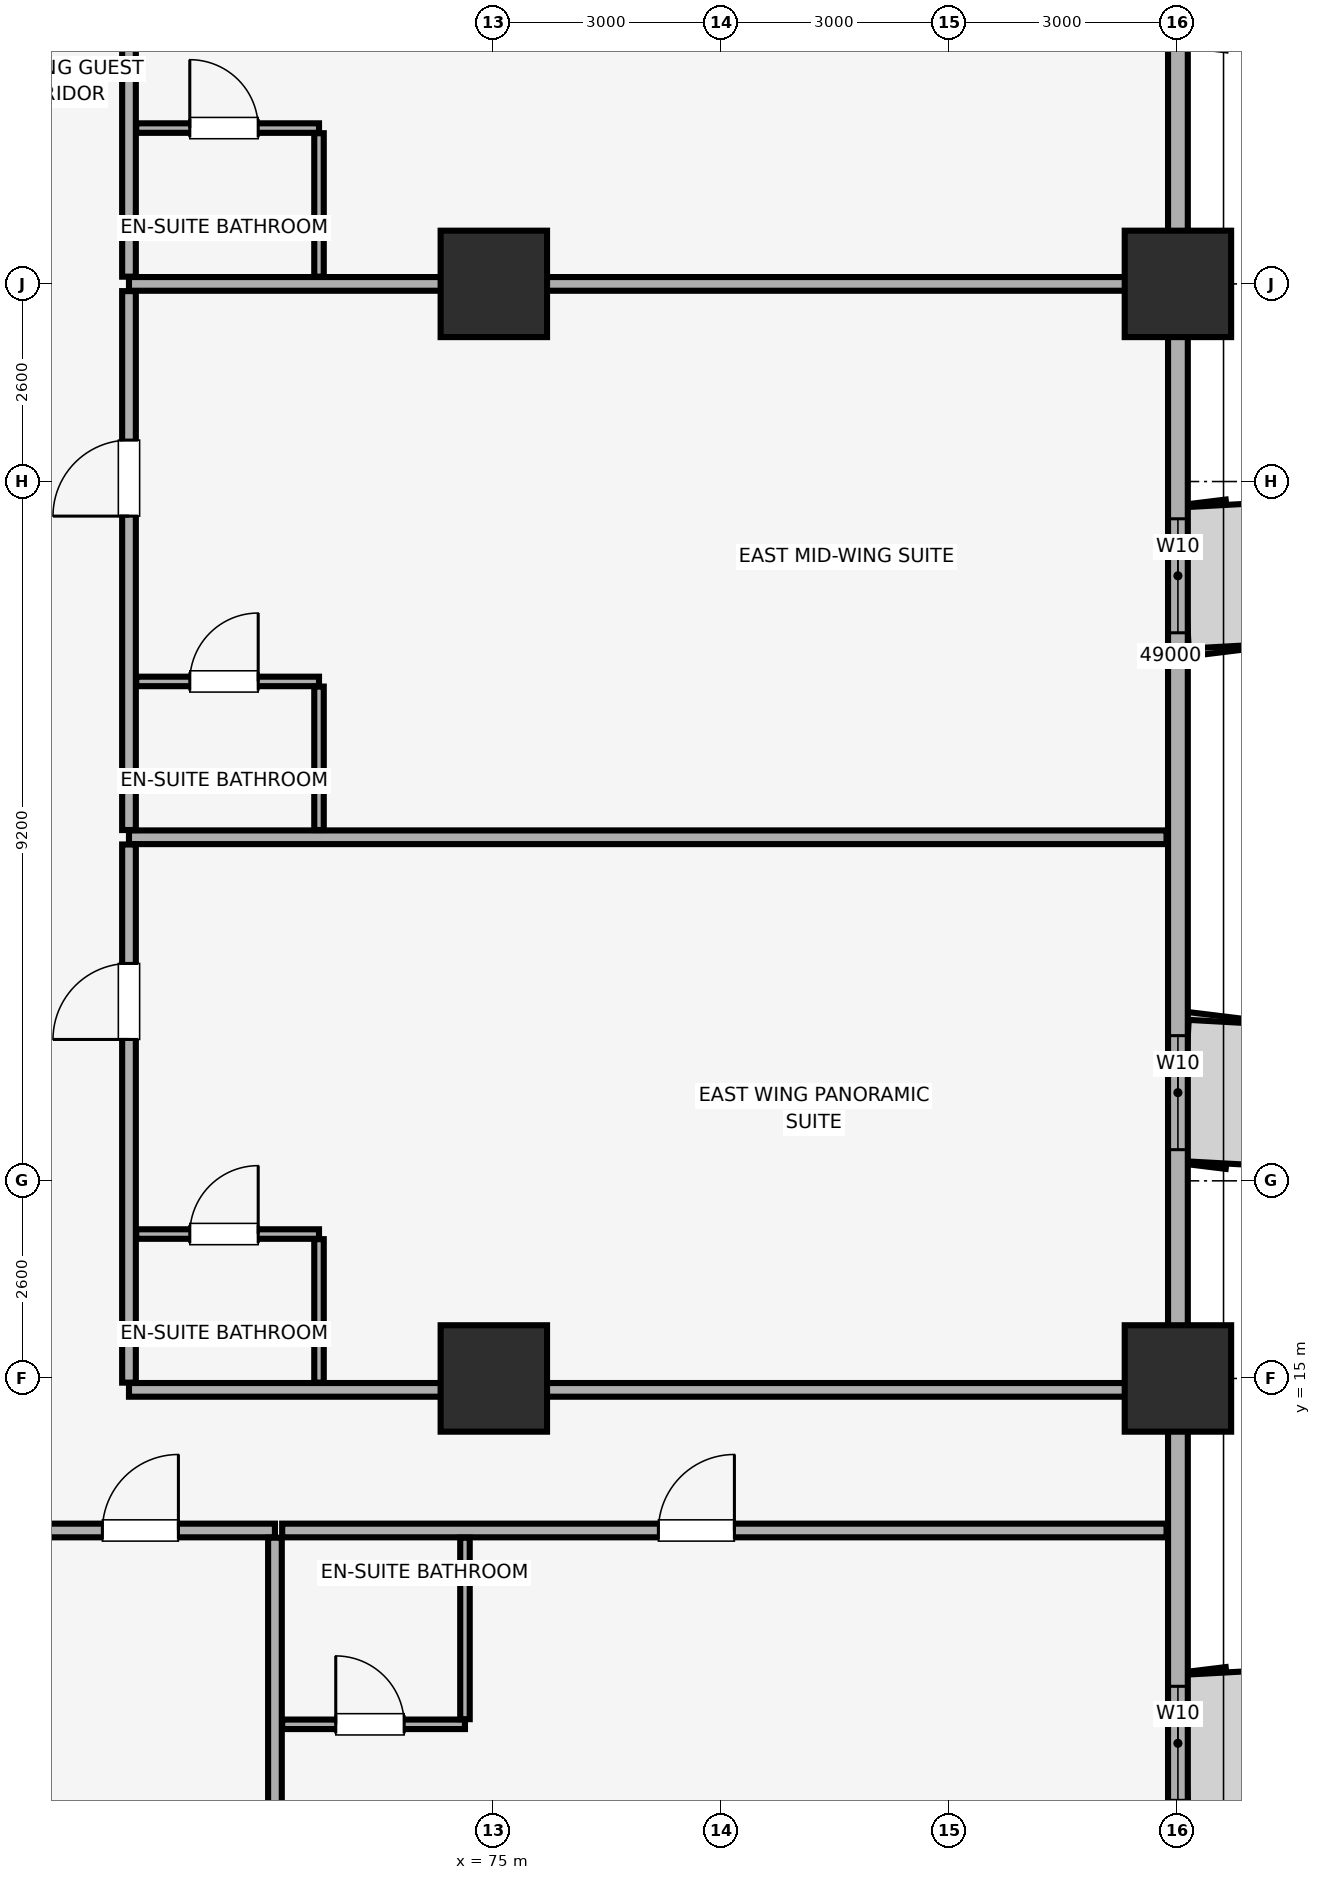
"""IFC4 building model, lengths in metres.
Left out: names, types, materials, properties, quantities, classifications, styles, units other than length and angle.
Written with IfcOpenShell. Run it as: python <this file> out.ifc"""

import sys

from ifc_helpers import new_model, si_unit, direction, frame, frame_2d, origin, origin_2d, place, context, subcontext, project, spatial, rectangle, extrude, element, fill, save


model = new_model("IFC4")
c1 = context("Model", 3, precision=1e-05, world=origin(), true_north=direction((0.0, 1.0)))
c2 = subcontext(c1, "Body", "Model", "MODEL_VIEW")
j1 = project(units=[si_unit("LENGTHUNIT", "METRE"), si_unit("PLANEANGLEUNIT", "RADIAN")], contexts=[c1])
p1 = place(None, origin())
s1 = spatial("IfcSite", under=j1, at=p1, CompositionType="ELEMENT")
p2 = place(p1, origin())
s2 = spatial("IfcBuilding", under=s1, at=p2, CompositionType="ELEMENT")
p3 = place(p2, frame((0.0, 0.0, 68.9)))
s3 = spatial("IfcBuildingStorey", under=s2, at=p3, CompositionType="ELEMENT", Elevation=68.9)
for number, where, z_axis, x_axis in (
    (1, (84.0, 15.0, 0.0), (0.0, 0.0, 1.0), (1.0, 0.0, 0.0)),
    (2, (84.0, 29.4, 0.0), (0.0, 0.0, 1.0), (1.0, 0.0, 0.0)),
    (3, (75.0, 15.0, 0.0), (0.0, 0.0, 1.0), (1.0, 0.0, 0.0)),
    (4, (75.0, 29.4, 0.0), (0.0, 0.0, 1.0), (1.0, 0.0, 0.0)),
):
    element("IfcColumn", number, at=place(p3, frame(where, z_axis=z_axis, x_axis=x_axis)), inside=s3, PredefinedType="COLUMN", context=c2, shape_type="SweptSolid", body=[
        extrude(rectangle(XDim=1.4, YDim=1.4, at=origin_2d()), origin(), (0.0, 0.0, 1.0), 3.51),
    ])
p4 = place(p3, frame((84.0, 4.2, 0.0), z_axis=(0.0, 0.0, 1.0), x_axis=(0.0, 1.0, 0.0)))
e5 = element("IfcWall", 5, at=p4, inside=s3, PredefinedType="SOLIDWALL", context=c2, shape_type="SweptSolid", body=[
    extrude(rectangle(XDim=40.6, YDim=0.26, at=frame_2d((20.3, 0.0))), origin(), (0.0, 0.0, 1.0), 2.56),
])
p5 = place(p4, frame((5.25, 0.0, 0.85)))
e6 = element("IfcOpeningElement", 6, at=p5, cuts=e5, PredefinedType="OPENING", context=c2, shape_type="SweptSolid", body=[
    extrude(rectangle(XDim=1.5, YDim=1.4, at=frame_2d((0.75, 0.7))), frame((0.0, 0.14, 0.0), z_axis=(0.0, -1.0, 0.0), x_axis=(1.0, 0.0, 0.0)), (0.0, 0.0, 1.0), 0.28),
])
p6 = place(p4, frame((13.81, 0.0, 0.85)))
e7 = element("IfcOpeningElement", 7, at=p6, cuts=e5, PredefinedType="OPENING", context=c2, shape_type="SweptSolid", body=[
    extrude(rectangle(XDim=1.5, YDim=1.4, at=frame_2d((0.75, 0.7))), frame((0.0, 0.14, 0.0), z_axis=(0.0, -1.0, 0.0), x_axis=(1.0, 0.0, 0.0)), (0.0, 0.0, 1.0), 0.28),
])
p7 = place(p4, frame((20.61, 0.0, 0.85)))
e8 = element("IfcOpeningElement", 8, at=p7, cuts=e5, PredefinedType="OPENING", context=c2, shape_type="SweptSolid", body=[
    extrude(rectangle(XDim=1.5, YDim=1.4, at=frame_2d((0.75, 0.7))), frame((0.0, 0.14, 0.0), z_axis=(0.0, -1.0, 0.0), x_axis=(1.0, 0.0, 0.0)), (0.0, 0.0, 1.0), 0.28),
])
p8 = place(p4, frame((28.525, 0.0, 0.85)))
e9 = element("IfcOpeningElement", 9, at=p8, cuts=e5, PredefinedType="OPENING", context=c2, shape_type="SweptSolid", body=[
    extrude(rectangle(XDim=1.5, YDim=1.4, at=frame_2d((0.75, 0.7))), frame((0.0, 0.14, 0.0), z_axis=(0.0, -1.0, 0.0), x_axis=(1.0, 0.0, 0.0)), (0.0, 0.0, 1.0), 0.28),
])
p9 = place(p4, frame((37.365, 0.0, 0.85)))
e10 = element("IfcOpeningElement", 10, at=p9, cuts=e5, PredefinedType="OPENING", context=c2, shape_type="SweptSolid", body=[
    extrude(rectangle(XDim=1.5, YDim=1.4, at=frame_2d((0.75, 0.7))), frame((0.0, 0.14, 0.0), z_axis=(0.0, -1.0, 0.0), x_axis=(1.0, 0.0, 0.0)), (0.0, 0.0, 1.0), 0.28),
])
p10 = place(p3, frame((64.786, 13.0, 0.0), z_axis=(0.0, 0.0, 1.0), x_axis=(1.0, 0.0, 0.0)))
e11 = element("IfcWall", 11, at=p10, inside=s3, PredefinedType="PARTITIONING", context=c2, shape_type="SweptSolid", body=[
    extrude(rectangle(XDim=7.335, YDim=0.18, at=frame_2d((3.667, 0.0))), origin(), (0.0, 0.0, 1.0), 3.51),
])
p11 = place(p10, frame((5.064, 0.0, 0.0)))
e12 = element("IfcOpeningElement", 12, at=p11, cuts=e11, PredefinedType="OPENING", context=c2, shape_type="SweptSolid", body=[
    extrude(rectangle(XDim=1.0, YDim=2.15, at=frame_2d((0.5, 1.075))), frame((0.0, 0.1, 0.0), z_axis=(0.0, -1.0, 0.0), x_axis=(1.0, 0.0, 0.0)), (0.0, 0.0, 1.0), 0.2),
])
p12 = place(p3, frame((72.12, 0.15, 0.0), z_axis=(0.0, 0.0, 1.0), x_axis=(0.0, 1.0, 0.0)))
e13 = element("IfcWall", 13, at=p12, inside=s3, PredefinedType="PARTITIONING", context=c2, shape_type="SweptSolid", body=[
    extrude(rectangle(XDim=12.755, YDim=0.18, at=frame_2d((6.377, 0.0))), origin(), (0.0, 0.0, 1.0), 3.51),
])
p13 = place(p3, frame((72.215, 13.0, 0.0), z_axis=(0.0, 0.0, 1.0), x_axis=(1.0, 0.0, 0.0)))
e14 = element("IfcWall", 14, at=p13, inside=s3, PredefinedType="PARTITIONING", context=c2, shape_type="SweptSolid", body=[
    extrude(rectangle(XDim=11.635, YDim=0.18, at=frame_2d((5.817, 0.0))), origin(), (0.0, 0.0, 1.0), 3.51),
])
p14 = place(p13, frame((4.95, 0.0, 0.0)))
e15 = element("IfcOpeningElement", 15, at=p14, cuts=e14, PredefinedType="OPENING", context=c2, shape_type="SweptSolid", body=[
    extrude(rectangle(XDim=1.0, YDim=2.15, at=frame_2d((0.5, 1.075))), frame((0.0, 0.1, 0.0), z_axis=(0.0, -1.0, 0.0), x_axis=(1.0, 0.0, 0.0)), (0.0, 0.0, 1.0), 0.2),
])
p15 = place(p3, frame((72.215, 10.45, 0.0), z_axis=(0.0, 0.0, 1.0), x_axis=(1.0, 0.0, 0.0)))
e16 = element("IfcWall", 16, at=p15, inside=s3, PredefinedType="PARTITIONING", context=c2, shape_type="SweptSolid", body=[
    extrude(rectangle(XDim=2.405, YDim=0.125, at=frame_2d((1.203, 0.0))), origin(), (0.0, 0.0, 1.0), 3.51),
])
p16 = place(p15, frame((0.705, 0.0, 0.0)))
e17 = element("IfcOpeningElement", 17, at=p16, cuts=e16, PredefinedType="OPENING", context=c2, shape_type="SweptSolid", body=[
    extrude(rectangle(XDim=0.9, YDim=2.1, at=frame_2d((0.45, 1.05))), frame((0.0, 0.073, 0.0), z_axis=(0.0, -1.0, 0.0), x_axis=(1.0, 0.0, 0.0)), (0.0, 0.0, 1.0), 0.145),
])
p17 = place(p3, frame((74.62, 10.518, 0.0), z_axis=(0.0, 0.0, 1.0), x_axis=(0.0, 1.0, 0.0)))
e18 = element("IfcWall", 18, at=p17, inside=s3, PredefinedType="PARTITIONING", context=c2, shape_type="SweptSolid", body=[
    extrude(rectangle(XDim=2.387, YDim=0.125, at=frame_2d((1.194, 0.0))), origin(), (0.0, 0.0, 1.0), 3.51),
])
p18 = place(p3, frame((70.2, 14.85, 0.0), z_axis=(0.0, 0.0, 1.0), x_axis=(1.0, 0.0, 0.0)))
e19 = element("IfcWall", 19, at=p18, inside=s3, PredefinedType="PARTITIONING", context=c2, shape_type="SweptSolid", body=[
    extrude(rectangle(XDim=13.65, YDim=0.18, at=frame_2d((6.825, 0.0))), origin(), (0.0, 0.0, 1.0), 2.86),
])
p19 = place(p3, frame((70.2, 22.12, 0.0), z_axis=(0.0, 0.0, 1.0), x_axis=(1.0, 0.0, 0.0)))
e20 = element("IfcWall", 20, at=p19, inside=s3, PredefinedType="PARTITIONING", context=c2, shape_type="SweptSolid", body=[
    extrude(rectangle(XDim=13.65, YDim=0.18, at=frame_2d((6.825, 0.0))), origin(), (0.0, 0.0, 1.0), 3.51),
])
p20 = place(p3, frame((70.2, 14.945, 0.0), z_axis=(0.0, 0.0, 1.0), x_axis=(0.0, 1.0, 0.0)))
e21 = element("IfcWall", 21, at=p20, inside=s3, PredefinedType="PARTITIONING", context=c2, shape_type="SweptSolid", body=[
    extrude(rectangle(XDim=7.08, YDim=0.18, at=frame_2d((3.54, 0.0))), origin(), (0.0, 0.0, 1.0), 3.51),
])
p21 = place(p20, frame((4.515, 0.0, 0.0)))
e22 = element("IfcOpeningElement", 22, at=p21, cuts=e21, PredefinedType="OPENING", context=c2, shape_type="SweptSolid", body=[
    extrude(rectangle(XDim=1.0, YDim=2.15, at=frame_2d((0.5, 1.075))), frame((0.0, 0.1, 0.0), z_axis=(0.0, -1.0, 0.0), x_axis=(1.0, 0.0, 0.0)), (0.0, 0.0, 1.0), 0.2),
])
p22 = place(p3, frame((70.295, 16.9, 0.0), z_axis=(0.0, 0.0, 1.0), x_axis=(1.0, 0.0, 0.0)))
e23 = element("IfcWall", 23, at=p22, inside=s3, PredefinedType="PARTITIONING", context=c2, shape_type="SweptSolid", body=[
    extrude(rectangle(XDim=2.405, YDim=0.125, at=frame_2d((1.203, 0.0))), origin(), (0.0, 0.0, 1.0), 3.51),
])
p23 = place(p22, frame((0.705, 0.0, 0.0)))
e24 = element("IfcOpeningElement", 24, at=p23, cuts=e23, PredefinedType="OPENING", context=c2, shape_type="SweptSolid", body=[
    extrude(rectangle(XDim=0.9, YDim=2.1, at=frame_2d((0.45, 1.05))), frame((0.0, 0.073, 0.0), z_axis=(0.0, -1.0, 0.0), x_axis=(1.0, 0.0, 0.0)), (0.0, 0.0, 1.0), 0.145),
])
p24 = place(p3, frame((72.7, 14.945, 0.0), z_axis=(0.0, 0.0, 1.0), x_axis=(0.0, 1.0, 0.0)))
e25 = element("IfcWall", 25, at=p24, inside=s3, PredefinedType="PARTITIONING", context=c2, shape_type="SweptSolid", body=[
    extrude(rectangle(XDim=1.887, YDim=0.125, at=frame_2d((0.944, 0.0))), origin(), (0.0, 0.0, 1.0), 3.51),
])
p25 = place(p3, frame((70.2, 29.4, 0.0), z_axis=(0.0, 0.0, 1.0), x_axis=(1.0, 0.0, 0.0)))
e26 = element("IfcWall", 26, at=p25, inside=s3, PredefinedType="PARTITIONING", context=c2, shape_type="SweptSolid", body=[
    extrude(rectangle(XDim=13.65, YDim=0.18, at=frame_2d((6.825, 0.0))), origin(), (0.0, 0.0, 1.0), 2.86),
])
p26 = place(p3, frame((70.2, 22.215, 0.0), z_axis=(0.0, 0.0, 1.0), x_axis=(0.0, 1.0, 0.0)))
e27 = element("IfcWall", 27, at=p26, inside=s3, PredefinedType="PARTITIONING", context=c2, shape_type="SweptSolid", body=[
    extrude(rectangle(XDim=7.09, YDim=0.18, at=frame_2d((3.545, 0.0))), origin(), (0.0, 0.0, 1.0), 3.51),
])
p27 = place(p26, frame((4.13, 0.0, 0.0)))
e28 = element("IfcOpeningElement", 28, at=p27, cuts=e27, PredefinedType="OPENING", context=c2, shape_type="SweptSolid", body=[
    extrude(rectangle(XDim=1.0, YDim=2.15, at=frame_2d((0.5, 1.075))), frame((0.0, 0.1, 0.0), z_axis=(0.0, -1.0, 0.0), x_axis=(1.0, 0.0, 0.0)), (0.0, 0.0, 1.0), 0.2),
])
p28 = place(p3, frame((70.295, 24.17, 0.0), z_axis=(0.0, 0.0, 1.0), x_axis=(1.0, 0.0, 0.0)))
e29 = element("IfcWall", 29, at=p28, inside=s3, PredefinedType="PARTITIONING", context=c2, shape_type="SweptSolid", body=[
    extrude(rectangle(XDim=2.405, YDim=0.125, at=frame_2d((1.203, 0.0))), origin(), (0.0, 0.0, 1.0), 3.51),
])
p29 = place(p28, frame((0.705, 0.0, 0.0)))
e30 = element("IfcOpeningElement", 30, at=p29, cuts=e29, PredefinedType="OPENING", context=c2, shape_type="SweptSolid", body=[
    extrude(rectangle(XDim=0.9, YDim=2.1, at=frame_2d((0.45, 1.05))), frame((0.0, 0.073, 0.0), z_axis=(0.0, -1.0, 0.0), x_axis=(1.0, 0.0, 0.0)), (0.0, 0.0, 1.0), 0.145),
])
p30 = place(p3, frame((72.7, 22.215, 0.0), z_axis=(0.0, 0.0, 1.0), x_axis=(0.0, 1.0, 0.0)))
e31 = element("IfcWall", 31, at=p30, inside=s3, PredefinedType="PARTITIONING", context=c2, shape_type="SweptSolid", body=[
    extrude(rectangle(XDim=1.887, YDim=0.125, at=frame_2d((0.944, 0.0))), origin(), (0.0, 0.0, 1.0), 3.51),
])
p31 = place(p3, frame((70.2, 29.495, 0.0), z_axis=(0.0, 0.0, 1.0), x_axis=(0.0, 1.0, 0.0)))
e32 = element("IfcWall", 32, at=p31, inside=s3, PredefinedType="PARTITIONING", context=c2, shape_type="SweptSolid", body=[
    extrude(rectangle(XDim=7.56, YDim=0.18, at=frame_2d((3.78, 0.0))), origin(), (0.0, 0.0, 1.0), 3.51),
])
p32 = place(p31, frame((4.755, 0.0, 0.0)))
e33 = element("IfcOpeningElement", 33, at=p32, cuts=e32, PredefinedType="OPENING", context=c2, shape_type="SweptSolid", body=[
    extrude(rectangle(XDim=1.0, YDim=2.15, at=frame_2d((0.5, 1.075))), frame((0.0, 0.1, 0.0), z_axis=(0.0, -1.0, 0.0), x_axis=(1.0, 0.0, 0.0)), (0.0, 0.0, 1.0), 0.2),
])
p33 = place(p3, frame((70.295, 31.45, 0.0), z_axis=(0.0, 0.0, 1.0), x_axis=(1.0, 0.0, 0.0)))
e34 = element("IfcWall", 34, at=p33, inside=s3, PredefinedType="PARTITIONING", context=c2, shape_type="SweptSolid", body=[
    extrude(rectangle(XDim=2.405, YDim=0.125, at=frame_2d((1.203, 0.0))), origin(), (0.0, 0.0, 1.0), 3.51),
])
p34 = place(p33, frame((0.705, 0.0, 0.0)))
e35 = element("IfcOpeningElement", 35, at=p34, cuts=e34, PredefinedType="OPENING", context=c2, shape_type="SweptSolid", body=[
    extrude(rectangle(XDim=0.9, YDim=2.1, at=frame_2d((0.45, 1.05))), frame((0.0, 0.073, 0.0), z_axis=(0.0, -1.0, 0.0), x_axis=(1.0, 0.0, 0.0)), (0.0, 0.0, 1.0), 0.145),
])
p35 = place(p3, frame((72.7, 29.495, 0.0), z_axis=(0.0, 0.0, 1.0), x_axis=(0.0, 1.0, 0.0)))
e36 = element("IfcWall", 36, at=p35, inside=s3, PredefinedType="PARTITIONING", context=c2, shape_type="SweptSolid", body=[
    extrude(rectangle(XDim=1.887, YDim=0.125, at=frame_2d((0.944, 0.0))), origin(), (0.0, 0.0, 1.0), 3.51),
])
p36 = place(p5, origin())
e37 = element("IfcWindow", 37, at=p36, inside=s3, PartitioningType="SINGLE_PANEL", PredefinedType="WINDOW", context=c2, shape_type="SweptSolid", body=[
    extrude(rectangle(XDim=1.5, YDim=1.4, at=frame_2d((0.75, 0.7))), frame((0.0, 0.03, 0.0), z_axis=(0.0, -1.0, 0.0), x_axis=(1.0, 0.0, 0.0)), (0.0, 0.0, 1.0), 0.06),
])
fill(e6, e37)
p37 = place(p6, origin())
e38 = element("IfcWindow", 38, at=p37, inside=s3, PartitioningType="SINGLE_PANEL", PredefinedType="WINDOW", context=c2, shape_type="SweptSolid", body=[
    extrude(rectangle(XDim=1.5, YDim=1.4, at=frame_2d((0.75, 0.7))), frame((0.0, 0.03, 0.0), z_axis=(0.0, -1.0, 0.0), x_axis=(1.0, 0.0, 0.0)), (0.0, 0.0, 1.0), 0.06),
])
fill(e7, e38)
p38 = place(p7, origin())
e39 = element("IfcWindow", 39, at=p38, inside=s3, PartitioningType="SINGLE_PANEL", PredefinedType="WINDOW", context=c2, shape_type="SweptSolid", body=[
    extrude(rectangle(XDim=1.5, YDim=1.4, at=frame_2d((0.75, 0.7))), frame((0.0, 0.03, 0.0), z_axis=(0.0, -1.0, 0.0), x_axis=(1.0, 0.0, 0.0)), (0.0, 0.0, 1.0), 0.06),
])
fill(e8, e39)
p39 = place(p11, origin())
e40 = element("IfcDoor", 40, at=p39, inside=s3, OperationType="SINGLE_SWING_RIGHT", PredefinedType="DOOR", context=c2, shape_type="SweptSolid", body=[
    extrude(rectangle(XDim=1.0, YDim=2.15, at=frame_2d((0.5, 1.075))), frame((0.0, 0.025, 0.0), z_axis=(0.0, -1.0, 0.0), x_axis=(1.0, 0.0, 0.0)), (0.0, 0.0, 1.0), 0.05),
])
fill(e12, e40)
p40 = place(p14, origin())
e41 = element("IfcDoor", 41, at=p40, inside=s3, OperationType="SINGLE_SWING_RIGHT", PredefinedType="DOOR", context=c2, shape_type="SweptSolid", body=[
    extrude(rectangle(XDim=1.0, YDim=2.15, at=frame_2d((0.5, 1.075))), frame((0.0, 0.025, 0.0), z_axis=(0.0, -1.0, 0.0), x_axis=(1.0, 0.0, 0.0)), (0.0, 0.0, 1.0), 0.05),
])
fill(e15, e41)
p41 = place(p16, origin())
e42 = element("IfcDoor", 42, at=p41, inside=s3, OperationType="SINGLE_SWING_LEFT", PredefinedType="DOOR", context=c2, shape_type="SweptSolid", body=[
    extrude(rectangle(XDim=0.9, YDim=2.1, at=frame_2d((0.45, 1.05))), frame((0.0, 0.025, 0.0), z_axis=(0.0, -1.0, 0.0), x_axis=(1.0, 0.0, 0.0)), (0.0, 0.0, 1.0), 0.05),
])
fill(e17, e42)
p42 = place(p21, origin())
e43 = element("IfcDoor", 43, at=p42, inside=s3, OperationType="SINGLE_SWING_LEFT", PredefinedType="DOOR", context=c2, shape_type="SweptSolid", body=[
    extrude(rectangle(XDim=1.0, YDim=2.15, at=frame_2d((0.5, 1.075))), frame((0.0, 0.025, 0.0), z_axis=(0.0, -1.0, 0.0), x_axis=(1.0, 0.0, 0.0)), (0.0, 0.0, 1.0), 0.05),
])
fill(e22, e43)
p43 = place(p23, origin())
e44 = element("IfcDoor", 44, at=p43, inside=s3, OperationType="SINGLE_SWING_RIGHT", PredefinedType="DOOR", context=c2, shape_type="SweptSolid", body=[
    extrude(rectangle(XDim=0.9, YDim=2.1, at=frame_2d((0.45, 1.05))), frame((0.0, 0.025, 0.0), z_axis=(0.0, -1.0, 0.0), x_axis=(1.0, 0.0, 0.0)), (0.0, 0.0, 1.0), 0.05),
])
fill(e24, e44)
p44 = place(p27, origin())
e45 = element("IfcDoor", 45, at=p44, inside=s3, OperationType="SINGLE_SWING_LEFT", PredefinedType="DOOR", context=c2, shape_type="SweptSolid", body=[
    extrude(rectangle(XDim=1.0, YDim=2.15, at=frame_2d((0.5, 1.075))), frame((0.0, 0.025, 0.0), z_axis=(0.0, -1.0, 0.0), x_axis=(1.0, 0.0, 0.0)), (0.0, 0.0, 1.0), 0.05),
])
fill(e28, e45)
p45 = place(p29, origin())
e46 = element("IfcDoor", 46, at=p45, inside=s3, OperationType="SINGLE_SWING_RIGHT", PredefinedType="DOOR", context=c2, shape_type="SweptSolid", body=[
    extrude(rectangle(XDim=0.9, YDim=2.1, at=frame_2d((0.45, 1.05))), frame((0.0, 0.025, 0.0), z_axis=(0.0, -1.0, 0.0), x_axis=(1.0, 0.0, 0.0)), (0.0, 0.0, 1.0), 0.05),
])
fill(e30, e46)
p46 = place(p34, origin())
e47 = element("IfcDoor", 47, at=p46, inside=s3, OperationType="SINGLE_SWING_LEFT", PredefinedType="DOOR", context=c2, shape_type="SweptSolid", body=[
    extrude(rectangle(XDim=0.9, YDim=2.1, at=frame_2d((0.45, 1.05))), frame((0.0, 0.025, 0.0), z_axis=(0.0, -1.0, 0.0), x_axis=(1.0, 0.0, 0.0)), (0.0, 0.0, 1.0), 0.05),
])
fill(e35, e47)
save(model, sys.argv[1])
